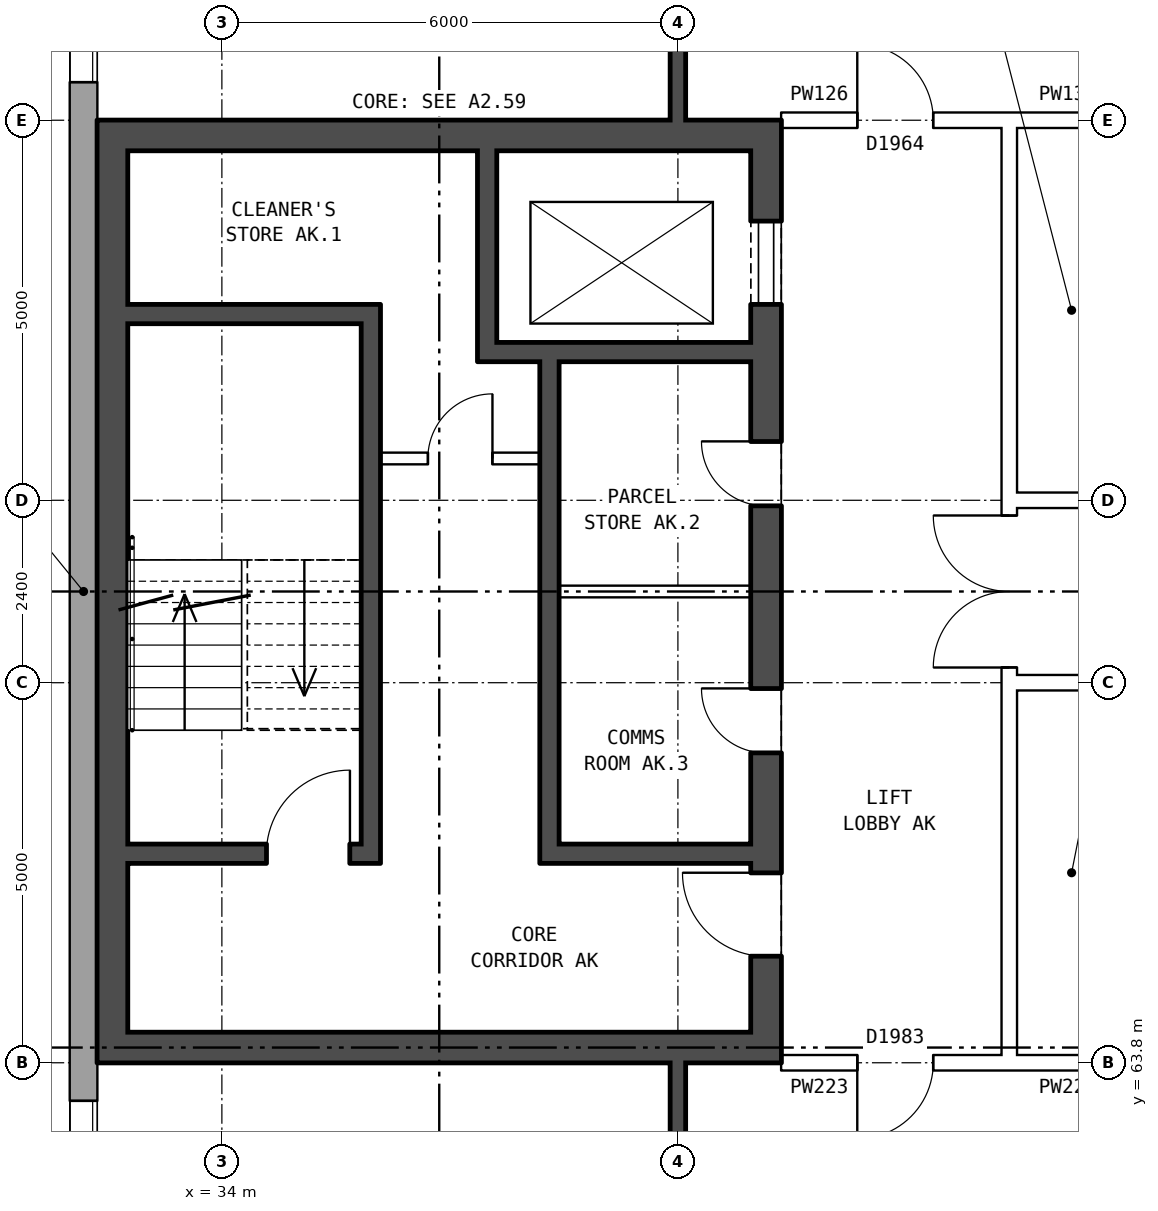
"""IFC4 building model, lengths in metres.
Left out: names, types, materials, properties, quantities, classifications, styles, units other than length and angle.
Written with IfcOpenShell. Run it as: python <this file> out.ifc"""

import sys

from ifc_helpers import new_model, si_unit, direction, frame, frame_2d, origin, place, context, subcontext, project, spatial, rectangle, extrude, element, fill, save


model = new_model("IFC4")
c1 = context("Model", 3, precision=1e-05, world=origin(), true_north=direction((0.0, 1.0)))
c2 = subcontext(c1, "Body", "Model", "MODEL_VIEW")
j1 = project(units=[si_unit("LENGTHUNIT", "METRE"), si_unit("PLANEANGLEUNIT", "RADIAN")], contexts=[c1])
p1 = place(None, origin())
s1 = spatial("IfcSite", under=j1, at=p1, CompositionType="ELEMENT")
p2 = place(p1, origin())
s2 = spatial("IfcBuilding", under=s1, at=p2, CompositionType="ELEMENT")
p3 = place(p2, frame((0.0, 0.0, 205.9)))
s3 = spatial("IfcBuildingStorey", under=s2, at=p3, CompositionType="ELEMENT", Elevation=205.9)
p4 = place(p3, frame((32.18, 82.925, 0.0), z_axis=(0.0, 0.0, 1.0), x_axis=(0.0, -1.0, 0.0)))
e1 = element("IfcWall", 1, at=p4, inside=s3, PredefinedType="STANDARD", context=c2, shape_type="SweptSolid", body=[
    extrude(rectangle(XDim=25.851, YDim=0.36, at=frame_2d((12.925, 0.0))), origin(), (0.0, 0.0, 1.0), 2.85),
])
p5 = place(p4, frame((2.225, 0.0, 0.8)))
e2 = element("IfcOpeningElement", 2, at=p5, cuts=e1, PredefinedType="OPENING", context=c2, shape_type="SweptSolid", body=[
    extrude(rectangle(XDim=0.6, YDim=0.9, at=frame_2d((0.3, 0.45))), frame((0.0, 0.19, 0.0), z_axis=(0.0, -1.0, 0.0), x_axis=(1.0, 0.0, 0.0)), (0.0, 0.0, 1.0), 0.38),
])
p6 = place(p4, frame((4.625, 0.0, 0.8)))
e3 = element("IfcOpeningElement", 3, at=p6, cuts=e1, PredefinedType="OPENING", context=c2, shape_type="SweptSolid", body=[
    extrude(rectangle(XDim=1.6, YDim=1.8, at=frame_2d((0.8, 0.9))), frame((0.0, 0.19, 0.0), z_axis=(0.0, -1.0, 0.0), x_axis=(1.0, 0.0, 0.0)), (0.0, 0.0, 1.0), 0.38),
])
p7 = place(p4, frame((19.625, 0.0, 0.8)))
e4 = element("IfcOpeningElement", 4, at=p7, cuts=e1, PredefinedType="OPENING", context=c2, shape_type="SweptSolid", body=[
    extrude(rectangle(XDim=1.6, YDim=1.8, at=frame_2d((0.8, 0.9))), frame((0.0, 0.19, 0.0), z_axis=(0.0, -1.0, 0.0), x_axis=(1.0, 0.0, 0.0)), (0.0, 0.0, 1.0), 0.38),
])
p8 = place(p4, frame((21.525, 0.0, 0.8)))
e5 = element("IfcOpeningElement", 5, at=p8, cuts=e1, PredefinedType="OPENING", context=c2, shape_type="SweptSolid", body=[
    extrude(rectangle(XDim=1.2, YDim=1.8, at=frame_2d((0.6, 0.9))), frame((0.0, 0.19, 0.0), z_axis=(0.0, -1.0, 0.0), x_axis=(1.0, 0.0, 0.0)), (0.0, 0.0, 1.0), 0.38),
])
p9 = place(p4, frame((3.125, 0.0, 0.8)))
e6 = element("IfcOpeningElement", 6, at=p9, cuts=e1, PredefinedType="OPENING", context=c2, shape_type="SweptSolid", body=[
    extrude(rectangle(XDim=1.2, YDim=1.8, at=frame_2d((0.6, 0.9))), frame((0.0, 0.19, 0.0), z_axis=(0.0, -1.0, 0.0), x_axis=(1.0, 0.0, 0.0)), (0.0, 0.0, 1.0), 0.38),
])
p10 = place(p4, frame((23.025, 0.0, 0.8)))
e7 = element("IfcOpeningElement", 7, at=p10, cuts=e1, PredefinedType="OPENING", context=c2, shape_type="SweptSolid", body=[
    extrude(rectangle(XDim=0.6, YDim=0.9, at=frame_2d((0.3, 0.45))), frame((0.0, 0.19, 0.0), z_axis=(0.0, -1.0, 0.0), x_axis=(1.0, 0.0, 0.0)), (0.0, 0.0, 1.0), 0.38),
])
p11 = place(p3, frame((41.16, 76.2, 0.0), z_axis=(0.0, 0.0, 1.0), x_axis=(0.0, -1.0, 0.0)))
e8 = element("IfcWall", 8, at=p11, inside=s3, PredefinedType="SHEAR", context=c2, shape_type="SweptSolid", body=[
    extrude(rectangle(XDim=12.4, YDim=0.4, at=frame_2d((6.2, 0.0))), origin(), (0.0, 0.0, 1.0), 2.85),
])
p12 = place(p11, frame((1.325, 0.0, 0.0)))
e9 = element("IfcOpeningElement", 9, at=p12, cuts=e8, PredefinedType="OPENING", context=c2, shape_type="SweptSolid", body=[
    extrude(rectangle(XDim=1.1, YDim=2.1, at=frame_2d((0.55, 1.05))), frame((0.0, 0.21, 0.0), z_axis=(0.0, -1.0, 0.0), x_axis=(1.0, 0.0, 0.0)), (0.0, 0.0, 1.0), 0.42),
])
p13 = place(p11, frame((4.225, 0.0, 0.0)))
e10 = element("IfcOpeningElement", 10, at=p13, cuts=e8, PredefinedType="OPENING", context=c2, shape_type="SweptSolid", body=[
    extrude(rectangle(XDim=0.85, YDim=2.1, at=frame_2d((0.425, 1.05))), frame((0.0, 0.21, 0.0), z_axis=(0.0, -1.0, 0.0), x_axis=(1.0, 0.0, 0.0)), (0.0, 0.0, 1.0), 0.42),
])
p14 = place(p11, frame((7.475, 0.0, 0.0)))
e11 = element("IfcOpeningElement", 11, at=p14, cuts=e8, PredefinedType="OPENING", context=c2, shape_type="SweptSolid", body=[
    extrude(rectangle(XDim=0.85, YDim=2.1, at=frame_2d((0.425, 1.05))), frame((0.0, 0.21, 0.0), z_axis=(0.0, -1.0, 0.0), x_axis=(1.0, 0.0, 0.0)), (0.0, 0.0, 1.0), 0.42),
])
p15 = place(p11, frame((9.9, 0.0, 0.0)))
e12 = element("IfcOpeningElement", 12, at=p15, cuts=e8, PredefinedType="OPENING", context=c2, shape_type="SweptSolid", body=[
    extrude(rectangle(XDim=1.1, YDim=2.1, at=frame_2d((0.55, 1.05))), frame((0.0, 0.21, 0.0), z_axis=(0.0, -1.0, 0.0), x_axis=(1.0, 0.0, 0.0)), (0.0, 0.0, 1.0), 0.42),
])
p16 = place(p3, frame((32.56, 76.2, 0.0), z_axis=(0.0, 0.0, 1.0), x_axis=(0.0, -1.0, 0.0)))
e13 = element("IfcWall", 13, at=p16, inside=s3, PredefinedType="SHEAR", context=c2, shape_type="SweptSolid", body=[
    extrude(rectangle(XDim=12.4, YDim=0.4, at=frame_2d((6.2, 0.0))), origin(), (0.0, 0.0, 1.0), 2.85),
])
for number, where, z_axis, x_axis in (
    (14, (40.96, 76.0, 0.0), (0.0, 0.0, 1.0), (-1.0, 0.0, 0.0)),
    (15, (40.96, 64.0, 0.0), (0.0, 0.0, 1.0), (-1.0, 0.0, 0.0)),
):
    element("IfcWall", number, at=place(p3, frame(where, z_axis=z_axis, x_axis=x_axis)), inside=s3, PredefinedType="SHEAR", context=c2, shape_type="SweptSolid", body=[
        extrude(rectangle(XDim=8.2, YDim=0.4, at=frame_2d((4.1, 0.0))), origin(), (0.0, 0.0, 1.0), 2.85),
    ])
p17 = place(p3, frame((35.835, 73.65, 0.0), z_axis=(0.0, 0.0, 1.0), x_axis=(-1.0, 0.0, 0.0)))
e16 = element("IfcWall", 16, at=p17, inside=s3, PredefinedType="SHEAR", context=c2, shape_type="SweptSolid", body=[
    extrude(rectangle(XDim=3.075, YDim=0.25, at=frame_2d((1.538, 0.0))), origin(), (0.0, 0.0, 1.0), 2.85),
])
p18 = place(p3, frame((40.96, 73.15, 0.0), z_axis=(0.0, 0.0, 1.0), x_axis=(-1.0, 0.0, 0.0)))
e17 = element("IfcWall", 17, at=p18, inside=s3, PredefinedType="SHEAR", context=c2, shape_type="SweptSolid", body=[
    extrude(rectangle(XDim=3.595, YDim=0.25, at=frame_2d((1.797, 0.0))), origin(), (0.0, 0.0, 1.0), 2.85),
])
p19 = place(p3, frame((38.185, 71.75, 0.0), z_axis=(0.0, 0.0, 1.0), x_axis=(-1.0, 0.0, 0.0)))
e18 = element("IfcWall", 18, at=p19, inside=s3, PredefinedType="PARTITIONING", context=c2, shape_type="SweptSolid", body=[
    extrude(rectangle(XDim=2.1, YDim=0.15, at=frame_2d((1.05, 0.0))), origin(), (0.0, 0.0, 1.0), 2.85),
])
p20 = place(p19, frame((0.625, 0.0, 0.0)))
e19 = element("IfcOpeningElement", 19, at=p20, cuts=e18, PredefinedType="OPENING", context=c2, shape_type="SweptSolid", body=[
    extrude(rectangle(XDim=0.85, YDim=2.1, at=frame_2d((0.425, 1.05))), frame((0.0, 0.085, 0.0), z_axis=(0.0, -1.0, 0.0), x_axis=(1.0, 0.0, 0.0)), (0.0, 0.0, 1.0), 0.17),
])
p21 = place(p3, frame((40.96, 70.0, 0.0), z_axis=(0.0, 0.0, 1.0), x_axis=(-1.0, 0.0, 0.0)))
e20 = element("IfcWall", 20, at=p21, inside=s3, PredefinedType="PARTITIONING", context=c2, shape_type="SweptSolid", body=[
    extrude(rectangle(XDim=2.525, YDim=0.15, at=frame_2d((1.262, 0.0))), origin(), (0.0, 0.0, 1.0), 2.85),
])
p22 = place(p3, frame((40.96, 66.55, 0.0), z_axis=(0.0, 0.0, 1.0), x_axis=(-1.0, 0.0, 0.0)))
e21 = element("IfcWall", 21, at=p22, inside=s3, PredefinedType="SHEAR", context=c2, shape_type="SweptSolid", body=[
    extrude(rectangle(XDim=2.525, YDim=0.25, at=frame_2d((1.262, 0.0))), origin(), (0.0, 0.0, 1.0), 2.85),
])
p23 = place(p3, frame((35.835, 66.55, 0.0), z_axis=(0.0, 0.0, 1.0), x_axis=(-1.0, 0.0, 0.0)))
e22 = element("IfcWall", 22, at=p23, inside=s3, PredefinedType="SHEAR", context=c2, shape_type="SweptSolid", body=[
    extrude(rectangle(XDim=3.075, YDim=0.25, at=frame_2d((1.538, 0.0))), origin(), (0.0, 0.0, 1.0), 2.85),
])
p24 = place(p23, frame((0.15, 0.0, 0.0)))
e23 = element("IfcOpeningElement", 23, at=p24, cuts=e22, PredefinedType="OPENING", context=c2, shape_type="SweptSolid", body=[
    extrude(rectangle(XDim=1.1, YDim=2.1, at=frame_2d((0.55, 1.05))), frame((0.0, 0.135, 0.0), z_axis=(0.0, -1.0, 0.0), x_axis=(1.0, 0.0, 0.0)), (0.0, 0.0, 1.0), 0.27),
])
p25 = place(p3, frame((38.31, 73.025, 0.0), z_axis=(0.0, 0.0, 1.0), x_axis=(0.0, -1.0, 0.0)))
e24 = element("IfcWall", 24, at=p25, inside=s3, PredefinedType="SHEAR", context=c2, shape_type="SweptSolid", body=[
    extrude(rectangle(XDim=6.6, YDim=0.25, at=frame_2d((3.3, 0.0))), origin(), (0.0, 0.0, 1.0), 2.85),
])
p26 = place(p3, frame((37.49, 75.8, 0.0), z_axis=(0.0, 0.0, 1.0), x_axis=(0.0, -1.0, 0.0)))
e25 = element("IfcWall", 25, at=p26, inside=s3, PredefinedType="SHEAR", context=c2, shape_type="SweptSolid", body=[
    extrude(rectangle(XDim=2.525, YDim=0.25, at=frame_2d((1.263, 0.0))), origin(), (0.0, 0.0, 1.0), 2.85),
])
p27 = place(p3, frame((35.96, 73.775, 0.0), z_axis=(0.0, 0.0, 1.0), x_axis=(0.0, -1.0, 0.0)))
e26 = element("IfcWall", 26, at=p27, inside=s3, PredefinedType="SHEAR", context=c2, shape_type="SweptSolid", body=[
    extrude(rectangle(XDim=7.35, YDim=0.25, at=frame_2d((3.675, 0.0))), origin(), (0.0, 0.0, 1.0), 2.85),
])
p28 = place(p3, frame((44.36, 63.9, 0.0), z_axis=(0.0, 0.0, 1.0), x_axis=(0.0, 1.0, 0.0)))
e27 = element("IfcWall", 27, at=p28, inside=s3, PredefinedType="PARTITIONING", context=c2, shape_type="SweptSolid", body=[
    extrude(rectangle(XDim=12.2, YDim=0.2, at=frame_2d((6.1, 0.0))), origin(), (0.0, 0.0, 1.0), 2.85),
])
p29 = place(p28, frame((5.1, 0.0, 0.0)))
e28 = element("IfcOpeningElement", 28, at=p29, cuts=e27, PredefinedType="OPENING", context=c2, shape_type="SweptSolid", body=[
    extrude(rectangle(XDim=2.0, YDim=2.1, at=frame_2d((1.0, 1.05))), frame((0.0, 0.11, 0.0), z_axis=(0.0, -1.0, 0.0), x_axis=(1.0, 0.0, 0.0)), (0.0, 0.0, 1.0), 0.22),
])
p30 = place(p3, frame((41.36, 63.8, 0.0), z_axis=(0.0, 0.0, 1.0), x_axis=(1.0, 0.0, 0.0)))
e29 = element("IfcWall", 29, at=p30, inside=s3, PredefinedType="PARTITIONING", context=c2, shape_type="SweptSolid", body=[
    extrude(rectangle(XDim=3.0, YDim=0.2, at=frame_2d((1.5, 0.0))), origin(), (0.0, 0.0, 1.0), 2.85),
])
p31 = place(p30, frame((1.0, 0.0, 0.0)))
e30 = element("IfcOpeningElement", 30, at=p31, cuts=e29, PredefinedType="OPENING", context=c2, shape_type="SweptSolid", body=[
    extrude(rectangle(XDim=1.0, YDim=2.1, at=frame_2d((0.5, 1.05))), frame((0.0, 0.11, 0.0), z_axis=(0.0, -1.0, 0.0), x_axis=(1.0, 0.0, 0.0)), (0.0, 0.0, 1.0), 0.22),
])
p32 = place(p3, frame((44.36, 63.8, 0.0), z_axis=(0.0, 0.0, 1.0), x_axis=(1.0, 0.0, 0.0)))
e31 = element("IfcWall", 31, at=p32, inside=s3, PredefinedType="PARTITIONING", context=c2, shape_type="SweptSolid", body=[
    extrude(rectangle(XDim=1.54, YDim=0.2, at=frame_2d((0.77, 0.0))), origin(), (0.0, 0.0, 1.0), 2.85),
])
p33 = place(p3, frame((44.36, 68.8, 0.0), z_axis=(0.0, 0.0, 1.0), x_axis=(1.0, 0.0, 0.0)))
e32 = element("IfcWall", 32, at=p33, inside=s3, PredefinedType="PARTITIONING", context=c2, shape_type="SweptSolid", body=[
    extrude(rectangle(XDim=19.28, YDim=0.2, at=frame_2d((9.64, 0.0))), origin(), (0.0, 0.0, 1.0), 2.85),
])
p34 = place(p33, frame((14.64, 0.0, 0.0)))
e33 = element("IfcOpeningElement", 33, at=p34, cuts=e32, PredefinedType="OPENING", context=c2, shape_type="SweptSolid", body=[
    extrude(rectangle(XDim=1.0, YDim=2.1, at=frame_2d((0.5, 1.05))), frame((0.0, 0.11, 0.0), z_axis=(0.0, -1.0, 0.0), x_axis=(1.0, 0.0, 0.0)), (0.0, 0.0, 1.0), 0.22),
])
p35 = place(p33, frame((8.64, 0.0, 0.0)))
e34 = element("IfcOpeningElement", 34, at=p35, cuts=e32, PredefinedType="OPENING", context=c2, shape_type="SweptSolid", body=[
    extrude(rectangle(XDim=1.0, YDim=2.1, at=frame_2d((0.5, 1.05))), frame((0.0, 0.11, 0.0), z_axis=(0.0, -1.0, 0.0), x_axis=(1.0, 0.0, 0.0)), (0.0, 0.0, 1.0), 0.22),
])
p36 = place(p33, frame((2.64, 0.0, 0.0)))
e35 = element("IfcOpeningElement", 35, at=p36, cuts=e32, PredefinedType="OPENING", context=c2, shape_type="SweptSolid", body=[
    extrude(rectangle(XDim=1.0, YDim=2.1, at=frame_2d((0.5, 1.05))), frame((0.0, 0.11, 0.0), z_axis=(0.0, -1.0, 0.0), x_axis=(1.0, 0.0, 0.0)), (0.0, 0.0, 1.0), 0.22),
])
p37 = place(p3, frame((44.36, 71.2, 0.0), z_axis=(0.0, 0.0, 1.0), x_axis=(1.0, 0.0, 0.0)))
e36 = element("IfcWall", 36, at=p37, inside=s3, PredefinedType="PARTITIONING", context=c2, shape_type="SweptSolid", body=[
    extrude(rectangle(XDim=19.28, YDim=0.2, at=frame_2d((9.64, 0.0))), origin(), (0.0, 0.0, 1.0), 2.85),
])
p38 = place(p37, frame((14.64, 0.0, 0.0)))
e37 = element("IfcOpeningElement", 37, at=p38, cuts=e36, PredefinedType="OPENING", context=c2, shape_type="SweptSolid", body=[
    extrude(rectangle(XDim=1.0, YDim=2.1, at=frame_2d((0.5, 1.05))), frame((0.0, 0.11, 0.0), z_axis=(0.0, -1.0, 0.0), x_axis=(1.0, 0.0, 0.0)), (0.0, 0.0, 1.0), 0.22),
])
p39 = place(p37, frame((5.64, 0.0, 0.0)))
e38 = element("IfcOpeningElement", 38, at=p39, cuts=e36, PredefinedType="OPENING", context=c2, shape_type="SweptSolid", body=[
    extrude(rectangle(XDim=1.0, YDim=2.1, at=frame_2d((0.5, 1.05))), frame((0.0, 0.11, 0.0), z_axis=(0.0, -1.0, 0.0), x_axis=(1.0, 0.0, 0.0)), (0.0, 0.0, 1.0), 0.22),
])
p40 = place(p3, frame((41.36, 76.2, 0.0), z_axis=(0.0, 0.0, 1.0), x_axis=(1.0, 0.0, 0.0)))
e39 = element("IfcWall", 39, at=p40, inside=s3, PredefinedType="PARTITIONING", context=c2, shape_type="SweptSolid", body=[
    extrude(rectangle(XDim=3.0, YDim=0.2, at=frame_2d((1.5, 0.0))), origin(), (0.0, 0.0, 1.0), 2.85),
])
p41 = place(p40, frame((1.0, 0.0, 0.0)))
e40 = element("IfcOpeningElement", 40, at=p41, cuts=e39, PredefinedType="OPENING", context=c2, shape_type="SweptSolid", body=[
    extrude(rectangle(XDim=1.0, YDim=2.1, at=frame_2d((0.5, 1.05))), frame((0.0, 0.11, 0.0), z_axis=(0.0, -1.0, 0.0), x_axis=(1.0, 0.0, 0.0)), (0.0, 0.0, 1.0), 0.22),
])
p42 = place(p3, frame((44.36, 76.2, 0.0), z_axis=(0.0, 0.0, 1.0), x_axis=(1.0, 0.0, 0.0)))
e41 = element("IfcWall", 41, at=p42, inside=s3, PredefinedType="PARTITIONING", context=c2, shape_type="SweptSolid", body=[
    extrude(rectangle(XDim=1.54, YDim=0.2, at=frame_2d((0.77, 0.0))), origin(), (0.0, 0.0, 1.0), 2.85),
])
p43 = place(p3, frame((40.0, 54.36, 0.0), z_axis=(0.0, 0.0, 1.0), x_axis=(0.0, 1.0, 0.0)))
e42 = element("IfcWall", 42, at=p43, inside=s3, PredefinedType="SOLIDWALL", context=c2, shape_type="SweptSolid", body=[
    extrude(rectangle(XDim=9.44, YDim=0.2, at=frame_2d((4.72, 0.0))), origin(), (0.0, 0.0, 1.0), 2.85),
])
p44 = place(p43, frame((7.34, 0.0, 0.0)))
e43 = element("IfcOpeningElement", 43, at=p44, cuts=e42, PredefinedType="OPENING", context=c2, shape_type="SweptSolid", body=[
    extrude(rectangle(XDim=0.9, YDim=2.1, at=frame_2d((0.45, 1.05))), frame((0.0, 0.11, 0.0), z_axis=(0.0, -1.0, 0.0), x_axis=(1.0, 0.0, 0.0)), (0.0, 0.0, 1.0), 0.22),
])
p45 = place(p3, frame((40.0, 76.2, 0.0), z_axis=(0.0, 0.0, 1.0), x_axis=(0.0, 1.0, 0.0)))
e44 = element("IfcWall", 44, at=p45, inside=s3, PredefinedType="SOLIDWALL", context=c2, shape_type="SweptSolid", body=[
    extrude(rectangle(XDim=9.44, YDim=0.2, at=frame_2d((4.72, 0.0))), origin(), (0.0, 0.0, 1.0), 2.85),
])
p46 = place(p45, frame((1.5, 0.0, 0.0)))
e45 = element("IfcOpeningElement", 45, at=p46, cuts=e44, PredefinedType="OPENING", context=c2, shape_type="SweptSolid", body=[
    extrude(rectangle(XDim=0.9, YDim=2.1, at=frame_2d((0.45, 1.05))), frame((0.0, 0.11, 0.0), z_axis=(0.0, -1.0, 0.0), x_axis=(1.0, 0.0, 0.0)), (0.0, 0.0, 1.0), 0.22),
])
p47 = place(p6, origin())
e46 = element("IfcWindow", 46, at=p47, inside=s3, PartitioningType="SINGLE_PANEL", PredefinedType="WINDOW", context=c2, shape_type="SweptSolid", body=[
    extrude(rectangle(XDim=1.6, YDim=1.8, at=frame_2d((0.8, 0.9))), frame((0.0, 0.15, 0.0), z_axis=(0.0, -1.0, 0.0), x_axis=(1.0, 0.0, 0.0)), (0.0, 0.0, 1.0), 0.06),
])
fill(e3, e46)
p48 = place(p7, origin())
e47 = element("IfcWindow", 47, at=p48, inside=s3, PartitioningType="SINGLE_PANEL", PredefinedType="WINDOW", context=c2, shape_type="SweptSolid", body=[
    extrude(rectangle(XDim=1.6, YDim=1.8, at=frame_2d((0.8, 0.9))), frame((0.0, 0.15, 0.0), z_axis=(0.0, -1.0, 0.0), x_axis=(1.0, 0.0, 0.0)), (0.0, 0.0, 1.0), 0.06),
])
fill(e4, e47)
p49 = place(p12, origin())
e48 = element("IfcDoor", 48, at=p49, inside=s3, OperationType="DOUBLE_DOOR_SLIDING", PredefinedType="DOOR", context=c2, shape_type="SweptSolid", body=[
    extrude(rectangle(XDim=1.1, YDim=2.1, at=frame_2d((0.55, 1.05))), frame((0.0, -0.135, 0.0), z_axis=(0.0, -1.0, 0.0), x_axis=(1.0, 0.0, 0.0)), (0.0, 0.0, 1.0), 0.05),
])
fill(e9, e48)
p50 = place(p13, frame((0.85, 0.0, 0.0), z_axis=(0.0, 0.0, 1.0), x_axis=(-1.0, 0.0, 0.0)))
e49 = element("IfcDoor", 49, at=p50, inside=s3, OperationType="SINGLE_SWING_RIGHT", PredefinedType="DOOR", context=c2, shape_type="SweptSolid", body=[
    extrude(rectangle(XDim=0.85, YDim=2.1, at=frame_2d((0.425, 1.05))), frame((0.0, 0.185, 0.0), z_axis=(0.0, -1.0, 0.0), x_axis=(1.0, 0.0, 0.0)), (0.0, 0.0, 1.0), 0.05),
])
fill(e10, e49)
p51 = place(p14, frame((0.85, 0.0, 0.0), z_axis=(0.0, 0.0, 1.0), x_axis=(-1.0, 0.0, 0.0)))
e50 = element("IfcDoor", 50, at=p51, inside=s3, OperationType="SINGLE_SWING_RIGHT", PredefinedType="DOOR", context=c2, shape_type="SweptSolid", body=[
    extrude(rectangle(XDim=0.85, YDim=2.1, at=frame_2d((0.425, 1.05))), frame((0.0, 0.185, 0.0), z_axis=(0.0, -1.0, 0.0), x_axis=(1.0, 0.0, 0.0)), (0.0, 0.0, 1.0), 0.05),
])
fill(e11, e50)
p52 = place(p15, frame((1.1, 0.0, 0.0), z_axis=(0.0, 0.0, 1.0), x_axis=(-1.0, 0.0, 0.0)))
e51 = element("IfcDoor", 51, at=p52, inside=s3, OperationType="SINGLE_SWING_RIGHT", PredefinedType="DOOR", context=c2, shape_type="SweptSolid", body=[
    extrude(rectangle(XDim=1.1, YDim=2.1, at=frame_2d((0.55, 1.05))), frame((0.0, 0.185, 0.0), z_axis=(0.0, -1.0, 0.0), x_axis=(1.0, 0.0, 0.0)), (0.0, 0.0, 1.0), 0.05),
])
fill(e12, e51)
p53 = place(p24, frame((1.1, 0.0, 0.0), z_axis=(0.0, 0.0, 1.0), x_axis=(-1.0, 0.0, 0.0)))
e52 = element("IfcDoor", 52, at=p53, inside=s3, OperationType="SINGLE_SWING_RIGHT", PredefinedType="DOOR", context=c2, shape_type="SweptSolid", body=[
    extrude(rectangle(XDim=1.1, YDim=2.1, at=frame_2d((0.55, 1.05))), frame((0.0, 0.025, 0.0), z_axis=(0.0, -1.0, 0.0), x_axis=(1.0, 0.0, 0.0)), (0.0, 0.0, 1.0), 0.05),
])
fill(e23, e52)
p54 = place(p20, frame((0.85, 0.0, 0.0), z_axis=(0.0, 0.0, 1.0), x_axis=(-1.0, 0.0, 0.0)))
e53 = element("IfcDoor", 53, at=p54, inside=s3, OperationType="SINGLE_SWING_RIGHT", PredefinedType="DOOR", context=c2, shape_type="SweptSolid", body=[
    extrude(rectangle(XDim=0.85, YDim=2.1, at=frame_2d((0.425, 1.05))), frame((0.0, 0.025, 0.0), z_axis=(0.0, -1.0, 0.0), x_axis=(1.0, 0.0, 0.0)), (0.0, 0.0, 1.0), 0.05),
])
fill(e19, e53)
p55 = place(p29, origin())
e54 = element("IfcDoor", 54, at=p55, inside=s3, OperationType="DOUBLE_DOOR_SINGLE_SWING", PredefinedType="DOOR", context=c2, shape_type="SweptSolid", body=[
    extrude(rectangle(XDim=2.0, YDim=2.1, at=frame_2d((1.0, 1.05))), frame((0.0, 0.025, 0.0), z_axis=(0.0, -1.0, 0.0), x_axis=(1.0, 0.0, 0.0)), (0.0, 0.0, 1.0), 0.05),
])
fill(e28, e54)
p56 = place(p31, frame((1.0, 0.0, 0.0), z_axis=(0.0, 0.0, 1.0), x_axis=(-1.0, 0.0, 0.0)))
e55 = element("IfcDoor", 55, at=p56, inside=s3, OperationType="SINGLE_SWING_RIGHT", PredefinedType="DOOR", context=c2, shape_type="SweptSolid", body=[
    extrude(rectangle(XDim=1.0, YDim=2.1, at=frame_2d((0.5, 1.05))), frame((0.0, 0.025, 0.0), z_axis=(0.0, -1.0, 0.0), x_axis=(1.0, 0.0, 0.0)), (0.0, 0.0, 1.0), 0.05),
])
fill(e30, e55)
p57 = place(p41, origin())
e56 = element("IfcDoor", 56, at=p57, inside=s3, OperationType="SINGLE_SWING_LEFT", PredefinedType="DOOR", context=c2, shape_type="SweptSolid", body=[
    extrude(rectangle(XDim=1.0, YDim=2.1, at=frame_2d((0.5, 1.05))), frame((0.0, 0.025, 0.0), z_axis=(0.0, -1.0, 0.0), x_axis=(1.0, 0.0, 0.0)), (0.0, 0.0, 1.0), 0.05),
])
fill(e40, e56)
save(model, sys.argv[1])
